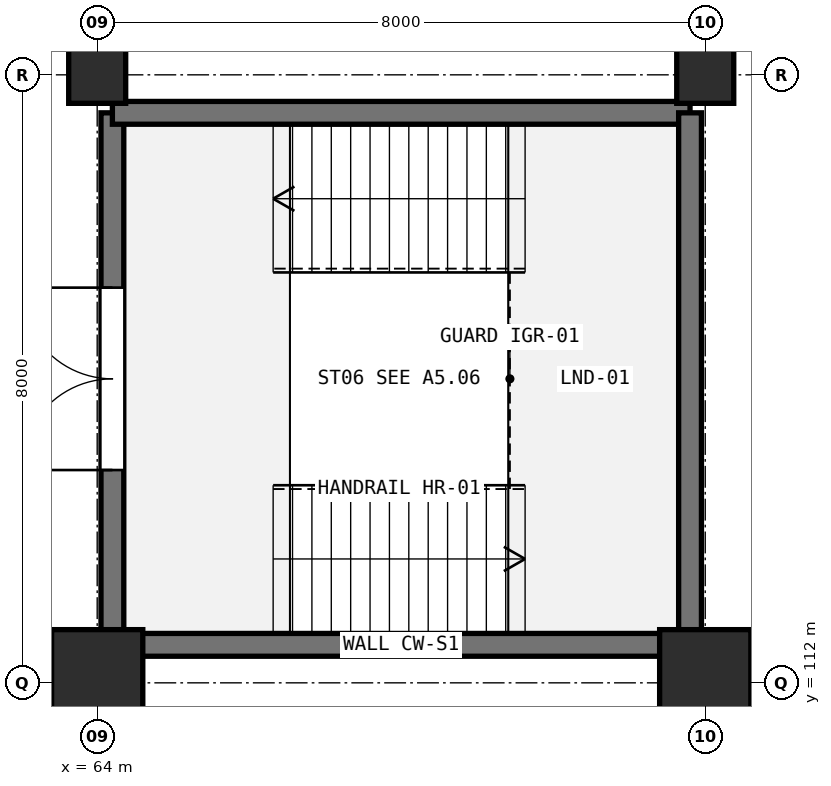
"""IFC4 building model, lengths in metres.
Left out: names, types, materials, properties, quantities, classifications, styles, units other than length and angle.
Written with IfcOpenShell. Run it as: python <this file> out.ifc"""

import sys

from ifc_helpers import new_model, si_unit, direction, frame, frame_2d, origin, origin_2d, place, context, subcontext, project, spatial, rectangle, extrude, element, fill, save


model = new_model("IFC4")
c1 = context("Model", 3, precision=1e-05, world=origin(), true_north=direction((0.0, 1.0)))
c2 = subcontext(c1, "Body", "Model", "MODEL_VIEW")
j1 = project(units=[si_unit("LENGTHUNIT", "METRE"), si_unit("PLANEANGLEUNIT", "RADIAN")], contexts=[c1])
p1 = place(None, origin())
s1 = spatial("IfcSite", under=j1, at=p1, CompositionType="ELEMENT")
p2 = place(p1, origin())
s2 = spatial("IfcBuilding", under=s1, at=p2, CompositionType="ELEMENT")
p3 = place(p2, frame((0.0, 0.0, -4.8)))
s3 = spatial("IfcBuildingStorey", under=s2, at=p3, CompositionType="ELEMENT", Elevation=-4.8)
p4 = place(p3, frame((64.0, 112.0, 0.0), z_axis=(0.0, 0.0, 1.0), x_axis=(1.0, 0.0, 0.0)))
e1 = element("IfcColumn", 1, at=p4, inside=s3, PredefinedType="COLUMN", context=c2, shape_type="SweptSolid", body=[
    extrude(rectangle(XDim=1.2, YDim=1.4, at=origin_2d()), origin(), (0.0, 0.0, 1.0), 4.8),
])
p5 = place(p3, frame((64.0, 120.0, 0.0), z_axis=(0.0, 0.0, 1.0), x_axis=(1.0, 0.0, 0.0)))
e2 = element("IfcColumn", 2, at=p5, inside=s3, PredefinedType="COLUMN", context=c2, shape_type="SweptSolid", body=[
    extrude(rectangle(XDim=0.75, YDim=0.75, at=origin_2d()), origin(), (0.0, 0.0, 1.0), 4.8),
])
p6 = place(p3, frame((72.0, 112.0, 0.0), z_axis=(0.0, 0.0, 1.0), x_axis=(1.0, 0.0, 0.0)))
e3 = element("IfcColumn", 3, at=p6, inside=s3, PredefinedType="COLUMN", context=c2, shape_type="SweptSolid", body=[
    extrude(rectangle(XDim=1.2, YDim=1.4, at=origin_2d()), origin(), (0.0, 0.0, 1.0), 4.8),
])
p7 = place(p3, frame((72.0, 120.0, 0.0), z_axis=(0.0, 0.0, 1.0), x_axis=(1.0, 0.0, 0.0)))
e4 = element("IfcColumn", 4, at=p7, inside=s3, PredefinedType="COLUMN", context=c2, shape_type="SweptSolid", body=[
    extrude(rectangle(XDim=0.75, YDim=0.75, at=origin_2d()), origin(), (0.0, 0.0, 1.0), 4.8),
])
p8 = place(p3, frame((71.8, 112.5, 0.0), z_axis=(0.0, 0.0, 1.0), x_axis=(-1.0, 0.0, 0.0)))
e5 = element("IfcWall", 5, at=p8, inside=s3, PredefinedType="SHEAR", context=c2, shape_type="SweptSolid", body=[
    extrude(rectangle(XDim=7.6, YDim=0.3, at=frame_2d((3.8, 0.0))), origin(), (0.0, 0.0, 1.0), 4.46),
])
p9 = place(p3, frame((64.2, 112.5, 0.0), z_axis=(0.0, 0.0, 1.0), x_axis=(0.0, 1.0, 0.0)))
e6 = element("IfcWall", 6, at=p9, inside=s3, PredefinedType="SHEAR", context=c2, shape_type="SweptSolid", body=[
    extrude(rectangle(XDim=7.0, YDim=0.3, at=frame_2d((3.5, 0.0))), origin(), (0.0, 0.0, 1.0), 4.46),
])
p10 = place(p9, frame((2.3, 0.0, 0.0)))
e7 = element("IfcOpeningElement", 7, at=p10, cuts=e6, PredefinedType="OPENING", context=c2, shape_type="SweptSolid", body=[
    extrude(rectangle(XDim=2.4, YDim=2.2, at=frame_2d((1.2, 1.1))), frame((0.0, 0.16, 0.0), z_axis=(0.0, -1.0, 0.0), x_axis=(1.0, 0.0, 0.0)), (0.0, 0.0, 1.0), 0.32),
])
p11 = place(p3, frame((64.2, 119.5, 0.0), z_axis=(0.0, 0.0, 1.0), x_axis=(1.0, 0.0, 0.0)))
e8 = element("IfcWall", 8, at=p11, inside=s3, PredefinedType="SHEAR", context=c2, shape_type="SweptSolid", body=[
    extrude(rectangle(XDim=7.6, YDim=0.3, at=frame_2d((3.8, 0.0))), origin(), (0.0, 0.0, 1.0), 4.46),
])
p12 = place(p3, frame((71.8, 119.5, 0.0), z_axis=(0.0, 0.0, 1.0), x_axis=(0.0, -1.0, 0.0)))
e9 = element("IfcWall", 9, at=p12, inside=s3, PredefinedType="SHEAR", context=c2, shape_type="SweptSolid", body=[
    extrude(rectangle(XDim=7.0, YDim=0.3, at=frame_2d((3.5, 0.0))), origin(), (0.0, 0.0, 1.0), 4.46),
])
p13 = place(p10, frame((2.4, 0.0, 0.0), z_axis=(0.0, 0.0, 1.0), x_axis=(-1.0, 0.0, 0.0)))
e10 = element("IfcDoor", 10, at=p13, inside=s3, OperationType="DOUBLE_DOOR_SINGLE_SWING", PredefinedType="DOOR", context=c2, shape_type="SweptSolid", body=[
    extrude(rectangle(XDim=2.4, YDim=2.2, at=frame_2d((1.2, 1.1))), frame((0.0, 0.025, 0.0), z_axis=(0.0, -1.0, 0.0), x_axis=(1.0, 0.0, 0.0)), (0.0, 0.0, 1.0), 0.05),
])
fill(e7, e10)
save(model, sys.argv[1])
